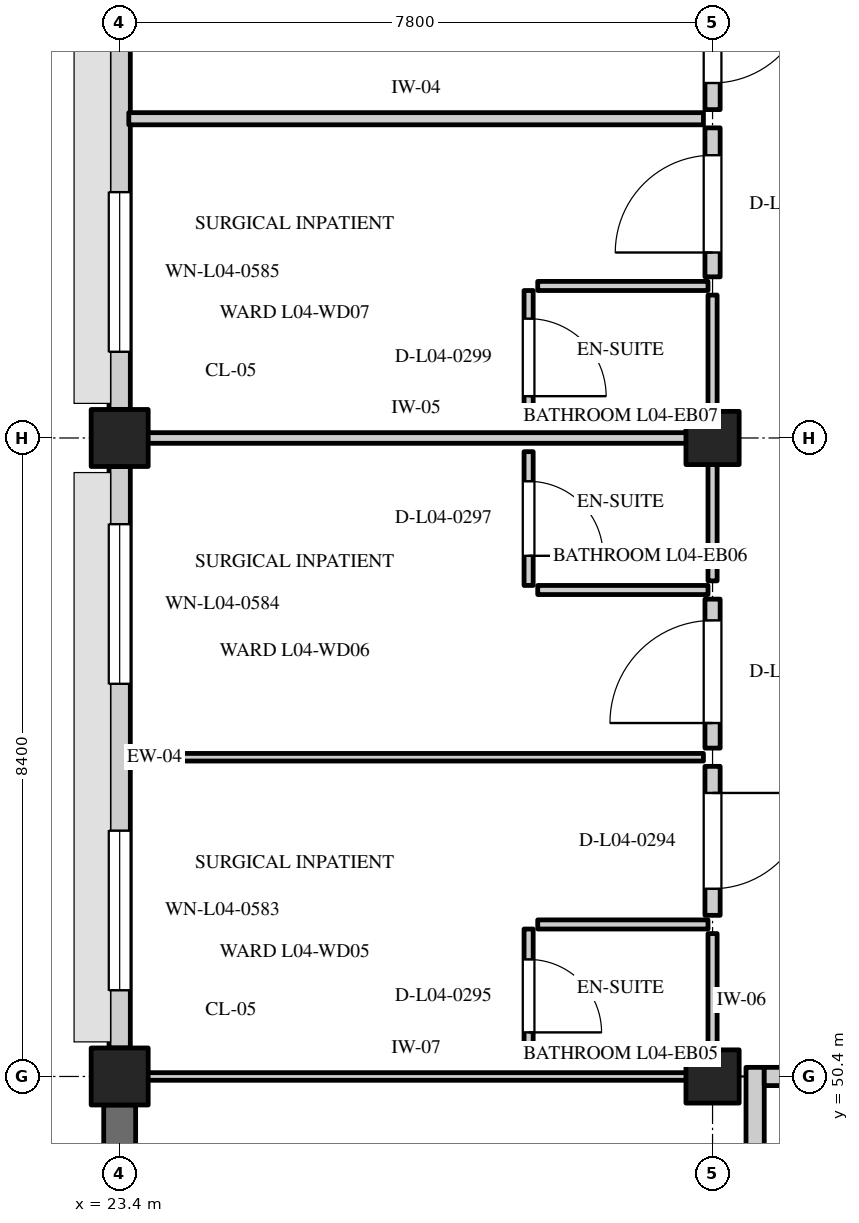
"""IFC4 building model, lengths in metres.
Left out: names, types, materials, properties, quantities, classifications, styles, units other than length and angle.
Written with IfcOpenShell. Run it as: python <this file> out.ifc"""

import sys

from ifc_helpers import new_model, si_unit, direction, frame, frame_2d, origin, origin_2d, place, context, subcontext, project, spatial, rectangle, extrude, element, fill, save


model = new_model("IFC4")
c1 = context("Model", 3, precision=1e-05, world=origin(), true_north=direction((0.0, 1.0)))
c2 = subcontext(c1, "Body", "Model", "MODEL_VIEW")
j1 = project(units=[si_unit("LENGTHUNIT", "METRE"), si_unit("PLANEANGLEUNIT", "RADIAN")], contexts=[c1])
p1 = place(None, origin())
s1 = spatial("IfcSite", under=j1, at=p1, CompositionType="ELEMENT")
p2 = place(p1, origin())
s2 = spatial("IfcBuilding", under=s1, at=p2, CompositionType="ELEMENT")
p3 = place(p2, frame((0.0, 0.0, 18.0)))
s3 = spatial("IfcBuildingStorey", under=s2, at=p3, CompositionType="ELEMENT", Elevation=18.0)
for number, where, z_axis, x_axis in (
    (1, (23.4, 50.4, 0.0), (0.0, 0.0, 1.0), (1.0, 0.0, 0.0)),
    (2, (23.4, 58.8, 0.0), (0.0, 0.0, 1.0), (1.0, 0.0, 0.0)),
):
    element("IfcColumn", number, at=place(p3, frame(where, z_axis=z_axis, x_axis=x_axis)), inside=s3, PredefinedType="COLUMN", context=c2, shape_type="SweptSolid", body=[
        extrude(rectangle(XDim=0.75, YDim=0.75, at=origin_2d()), origin(), (0.0, 0.0, 1.0), 4.2),
    ])
for number, where, z_axis, x_axis in (
    (3, (31.2, 50.4, 0.0), (0.0, 0.0, 1.0), (1.0, 0.0, 0.0)),
    (4, (31.2, 58.8, 0.0), (0.0, 0.0, 1.0), (1.0, 0.0, 0.0)),
):
    element("IfcColumn", number, at=place(p3, frame(where, z_axis=z_axis, x_axis=x_axis)), inside=s3, PredefinedType="COLUMN", context=c2, shape_type="SweptSolid", body=[
        extrude(rectangle(XDim=0.7, YDim=0.7, at=origin_2d()), origin(), (0.0, 0.0, 1.0), 4.2),
    ])
p4 = place(p3, frame((23.4, 42.375, 0.0), z_axis=(0.0, 0.0, 1.0), x_axis=(0.0, 1.0, 0.0)))
e5 = element("IfcWall", 5, at=p4, inside=s3, PredefinedType="SOLIDWALL", context=c2, shape_type="SweptSolid", body=[
    extrude(rectangle(XDim=7.65, YDim=0.42, at=frame_2d((3.825, 0.0))), origin(), (0.0, 0.0, 1.0), 3.235),
])
p5 = place(p4, frame((3.375, 0.0, 0.8)))
e6 = element("IfcOpeningElement", 6, at=p5, cuts=e5, PredefinedType="OPENING", context=c2, shape_type="SweptSolid", body=[
    extrude(rectangle(XDim=0.9, YDim=1.3, at=frame_2d((0.45, 0.65))), frame((0.0, 0.222, 0.0), z_axis=(0.0, -1.0, 0.0), x_axis=(1.0, 0.0, 0.0)), (0.0, 0.0, 1.0), 0.444),
])
p6 = place(p3, frame((23.4, 50.775, 0.0), z_axis=(0.0, 0.0, 1.0), x_axis=(0.0, 1.0, 0.0)))
e7 = element("IfcWall", 7, at=p6, inside=s3, PredefinedType="STANDARD", context=c2, shape_type="SweptSolid", body=[
    extrude(rectangle(XDim=7.65, YDim=0.28, at=frame_2d((3.825, 0.0))), origin(), (0.0, 0.0, 1.0), 3.235),
])
p7 = place(p6, frame((0.759, 0.0, 0.8)))
e8 = element("IfcOpeningElement", 8, at=p7, cuts=e7, PredefinedType="OPENING", context=c2, shape_type="SweptSolid", body=[
    extrude(rectangle(XDim=2.1, YDim=1.55, at=frame_2d((1.05, 0.775))), frame((0.0, 0.152, 0.0), z_axis=(0.0, -1.0, 0.0), x_axis=(1.0, 0.0, 0.0)), (0.0, 0.0, 1.0), 0.304),
])
p8 = place(p6, frame((4.791, 0.0, 0.8)))
e9 = element("IfcOpeningElement", 9, at=p8, cuts=e7, PredefinedType="OPENING", context=c2, shape_type="SweptSolid", body=[
    extrude(rectangle(XDim=2.1, YDim=1.55, at=frame_2d((1.05, 0.775))), frame((0.0, 0.152, 0.0), z_axis=(0.0, -1.0, 0.0), x_axis=(1.0, 0.0, 0.0)), (0.0, 0.0, 1.0), 0.304),
])
p9 = place(p3, frame((23.4, 59.175, 0.0), z_axis=(0.0, 0.0, 1.0), x_axis=(0.0, 1.0, 0.0)))
e10 = element("IfcWall", 10, at=p9, inside=s3, PredefinedType="STANDARD", context=c2, shape_type="SweptSolid", body=[
    extrude(rectangle(XDim=7.65, YDim=0.28, at=frame_2d((3.825, 0.0))), origin(), (0.0, 0.0, 1.0), 3.235),
])
p10 = place(p9, frame((0.759, 0.0, 0.8)))
e11 = element("IfcOpeningElement", 11, at=p10, cuts=e10, PredefinedType="OPENING", context=c2, shape_type="SweptSolid", body=[
    extrude(rectangle(XDim=2.1, YDim=1.45, at=frame_2d((1.05, 0.725))), frame((0.0, 0.152, 0.0), z_axis=(0.0, -1.0, 0.0), x_axis=(1.0, 0.0, 0.0)), (0.0, 0.0, 1.0), 0.304),
])
p11 = place(p9, frame((4.791, 0.0, 0.8)))
e12 = element("IfcOpeningElement", 12, at=p11, cuts=e10, PredefinedType="OPENING", context=c2, shape_type="SweptSolid", body=[
    extrude(rectangle(XDim=2.1, YDim=1.45, at=frame_2d((1.05, 0.725))), frame((0.0, 0.152, 0.0), z_axis=(0.0, -1.0, 0.0), x_axis=(1.0, 0.0, 0.0)), (0.0, 0.0, 1.0), 0.304),
])
p12 = place(p3, frame((31.76, 46.57, 0.0), z_axis=(0.0, 0.0, 1.0), x_axis=(0.0, 1.0, 0.0)))
e13 = element("IfcWall", 13, at=p12, inside=s3, PredefinedType="STANDARD", context=c2, shape_type="SweptSolid", body=[
    extrude(rectangle(XDim=3.95, YDim=0.24, at=frame_2d((1.975, 0.0))), origin(), (0.0, 0.0, 1.0), 3.385),
])
p13 = place(p3, frame((31.88, 50.4, 0.0), z_axis=(0.0, 0.0, 1.0), x_axis=(1.0, 0.0, 0.0)))
e14 = element("IfcWall", 14, at=p13, inside=s3, PredefinedType="STANDARD", context=c2, shape_type="SweptSolid", body=[
    extrude(rectangle(XDim=3.27, YDim=0.24, at=frame_2d((1.635, 0.0))), origin(), (0.0, 0.0, 1.0), 3.385),
])
p14 = place(p13, frame((0.91, 0.0, 0.0)))
e15 = element("IfcOpeningElement", 15, at=p14, cuts=e14, PredefinedType="OPENING", context=c2, shape_type="SweptSolid", body=[
    extrude(rectangle(XDim=1.45, YDim=2.2, at=frame_2d((0.725, 1.1))), frame((0.0, 0.132, 0.0), z_axis=(0.0, -1.0, 0.0), x_axis=(1.0, 0.0, 0.0)), (0.0, 0.0, 1.0), 0.264),
])
p15 = place(p3, frame((23.52, 50.4, 0.0), z_axis=(0.0, 0.0, 1.0), x_axis=(1.0, 0.0, 0.0)))
e16 = element("IfcWall", 16, at=p15, inside=s3, PredefinedType="PARTITIONING", context=c2, shape_type="SweptSolid", body=[
    extrude(rectangle(XDim=7.56, YDim=0.1, at=frame_2d((3.78, 0.0))), origin(), (0.0, 0.0, 1.0), 3.235),
])
p16 = place(p3, frame((23.52, 54.6, 0.0), z_axis=(0.0, 0.0, 1.0), x_axis=(1.0, 0.0, 0.0)))
e17 = element("IfcWall", 17, at=p16, inside=s3, PredefinedType="PARTITIONING", context=c2, shape_type="SweptSolid", body=[
    extrude(rectangle(XDim=7.56, YDim=0.1, at=frame_2d((3.78, 0.0))), origin(), (0.0, 0.0, 1.0), 3.865),
])
p17 = place(p3, frame((31.2, 52.52, 0.0), z_axis=(0.0, 0.0, 1.0), x_axis=(0.0, 1.0, 0.0)))
e18 = element("IfcWall", 18, at=p17, inside=s3, PredefinedType="STANDARD", context=c2, shape_type="SweptSolid", body=[
    extrude(rectangle(XDim=1.96, YDim=0.2, at=frame_2d((0.98, 0.0))), origin(), (0.0, 0.0, 1.0), 3.865),
])
p18 = place(p17, frame((0.35, 0.0, 0.0)))
e19 = element("IfcOpeningElement", 19, at=p18, cuts=e18, PredefinedType="OPENING", context=c2, shape_type="SweptSolid", body=[
    extrude(rectangle(XDim=1.26, YDim=2.1, at=frame_2d((0.63, 1.05))), frame((0.0, 0.112, 0.0), z_axis=(0.0, -1.0, 0.0), x_axis=(1.0, 0.0, 0.0)), (0.0, 0.0, 1.0), 0.224),
])
p19 = place(p3, frame((31.2, 50.52, 0.0), z_axis=(0.0, 0.0, 1.0), x_axis=(0.0, 1.0, 0.0)))
e20 = element("IfcWall", 20, at=p19, inside=s3, PredefinedType="PARTITIONING", context=c2, shape_type="SweptSolid", body=[
    extrude(rectangle(XDim=1.76, YDim=0.12, at=frame_2d((0.88, 0.0))), origin(), (0.0, 0.0, 1.0), 3.865),
])
p20 = place(p3, frame((28.9, 52.4, 0.0), z_axis=(0.0, 0.0, 1.0), x_axis=(1.0, 0.0, 0.0)))
e21 = element("IfcWall", 21, at=p20, inside=s3, PredefinedType="PARTITIONING", context=c2, shape_type="SweptSolid", body=[
    extrude(rectangle(XDim=2.24, YDim=0.12, at=frame_2d((1.12, 0.0))), origin(), (0.0, 0.0, 1.0), 3.865),
])
p21 = place(p3, frame((28.78, 50.58, 0.0), z_axis=(0.0, 0.0, 1.0), x_axis=(0.0, 1.0, 0.0)))
e22 = element("IfcWall", 22, at=p21, inside=s3, PredefinedType="PARTITIONING", context=c2, shape_type="SweptSolid", body=[
    extrude(rectangle(XDim=1.76, YDim=0.12, at=frame_2d((0.88, 0.0))), origin(), (0.0, 0.0, 1.0), 3.865),
])
p22 = place(p21, frame((0.4, 0.0, 0.0)))
e23 = element("IfcOpeningElement", 23, at=p22, cuts=e22, PredefinedType="OPENING", context=c2, shape_type="SweptSolid", body=[
    extrude(rectangle(XDim=0.96, YDim=2.12, at=frame_2d((0.48, 1.06))), frame((0.0, 0.072, 0.0), z_axis=(0.0, -1.0, 0.0), x_axis=(1.0, 0.0, 0.0)), (0.0, 0.0, 1.0), 0.144),
])
p23 = place(p3, frame((23.52, 58.8, 0.0), z_axis=(0.0, 0.0, 1.0), x_axis=(1.0, 0.0, 0.0)))
e24 = element("IfcWall", 24, at=p23, inside=s3, PredefinedType="PARTITIONING", context=c2, shape_type="SweptSolid", body=[
    extrude(rectangle(XDim=7.56, YDim=0.14, at=frame_2d((3.78, 0.0))), origin(), (0.0, 0.0, 1.0), 3.235),
])
p24 = place(p3, frame((31.2, 54.72, 0.0), z_axis=(0.0, 0.0, 1.0), x_axis=(0.0, 1.0, 0.0)))
e25 = element("IfcWall", 25, at=p24, inside=s3, PredefinedType="STANDARD", context=c2, shape_type="SweptSolid", body=[
    extrude(rectangle(XDim=1.96, YDim=0.2, at=frame_2d((0.98, 0.0))), origin(), (0.0, 0.0, 1.0), 3.865),
])
p25 = place(p24, frame((0.33, 0.0, 0.0)))
e26 = element("IfcOpeningElement", 26, at=p25, cuts=e25, PredefinedType="OPENING", context=c2, shape_type="SweptSolid", body=[
    extrude(rectangle(XDim=1.35, YDim=2.15, at=frame_2d((0.675, 1.075))), frame((0.0, 0.112, 0.0), z_axis=(0.0, -1.0, 0.0), x_axis=(1.0, 0.0, 0.0)), (0.0, 0.0, 1.0), 0.224),
])
p26 = place(p3, frame((31.2, 56.92, 0.0), z_axis=(0.0, 0.0, 1.0), x_axis=(0.0, 1.0, 0.0)))
e27 = element("IfcWall", 27, at=p26, inside=s3, PredefinedType="PARTITIONING", context=c2, shape_type="SweptSolid", body=[
    extrude(rectangle(XDim=1.76, YDim=0.12, at=frame_2d((0.88, 0.0))), origin(), (0.0, 0.0, 1.0), 3.865),
])
p27 = place(p3, frame((28.9, 56.8, 0.0), z_axis=(0.0, 0.0, 1.0), x_axis=(1.0, 0.0, 0.0)))
e28 = element("IfcWall", 28, at=p27, inside=s3, PredefinedType="PARTITIONING", context=c2, shape_type="SweptSolid", body=[
    extrude(rectangle(XDim=2.24, YDim=0.12, at=frame_2d((1.12, 0.0))), origin(), (0.0, 0.0, 1.0), 3.865),
])
p28 = place(p3, frame((28.78, 56.86, 0.0), z_axis=(0.0, 0.0, 1.0), x_axis=(0.0, 1.0, 0.0)))
e29 = element("IfcWall", 29, at=p28, inside=s3, PredefinedType="PARTITIONING", context=c2, shape_type="SweptSolid", body=[
    extrude(rectangle(XDim=1.76, YDim=0.12, at=frame_2d((0.88, 0.0))), origin(), (0.0, 0.0, 1.0), 3.865),
])
p29 = place(p28, frame((0.39, 0.0, 0.0)))
e30 = element("IfcOpeningElement", 30, at=p29, cuts=e29, PredefinedType="OPENING", context=c2, shape_type="SweptSolid", body=[
    extrude(rectangle(XDim=0.98, YDim=2.1, at=frame_2d((0.49, 1.05))), frame((0.0, 0.072, 0.0), z_axis=(0.0, -1.0, 0.0), x_axis=(1.0, 0.0, 0.0)), (0.0, 0.0, 1.0), 0.144),
])
p30 = place(p3, frame((23.52, 63.0, 0.0), z_axis=(0.0, 0.0, 1.0), x_axis=(1.0, 0.0, 0.0)))
e31 = element("IfcWall", 31, at=p30, inside=s3, PredefinedType="PARTITIONING", context=c2, shape_type="SweptSolid", body=[
    extrude(rectangle(XDim=7.56, YDim=0.16, at=frame_2d((3.78, 0.0))), origin(), (0.0, 0.0, 1.0), 3.865),
])
p31 = place(p3, frame((31.2, 60.92, 0.0), z_axis=(0.0, 0.0, 1.0), x_axis=(0.0, 1.0, 0.0)))
e32 = element("IfcWall", 32, at=p31, inside=s3, PredefinedType="STANDARD", context=c2, shape_type="SweptSolid", body=[
    extrude(rectangle(XDim=1.96, YDim=0.2, at=frame_2d((0.98, 0.0))), origin(), (0.0, 0.0, 1.0), 3.865),
])
p32 = place(p31, frame((0.32, 0.0, 0.0)))
e33 = element("IfcOpeningElement", 33, at=p32, cuts=e32, PredefinedType="OPENING", context=c2, shape_type="SweptSolid", body=[
    extrude(rectangle(XDim=1.28, YDim=2.15, at=frame_2d((0.64, 1.075))), frame((0.0, 0.112, 0.0), z_axis=(0.0, -1.0, 0.0), x_axis=(1.0, 0.0, 0.0)), (0.0, 0.0, 1.0), 0.224),
])
p33 = place(p3, frame((31.2, 58.92, 0.0), z_axis=(0.0, 0.0, 1.0), x_axis=(0.0, 1.0, 0.0)))
e34 = element("IfcWall", 34, at=p33, inside=s3, PredefinedType="PARTITIONING", context=c2, shape_type="SweptSolid", body=[
    extrude(rectangle(XDim=1.76, YDim=0.12, at=frame_2d((0.88, 0.0))), origin(), (0.0, 0.0, 1.0), 3.865),
])
p34 = place(p3, frame((28.9, 60.8, 0.0), z_axis=(0.0, 0.0, 1.0), x_axis=(1.0, 0.0, 0.0)))
e35 = element("IfcWall", 35, at=p34, inside=s3, PredefinedType="PARTITIONING", context=c2, shape_type="SweptSolid", body=[
    extrude(rectangle(XDim=2.24, YDim=0.12, at=frame_2d((1.12, 0.0))), origin(), (0.0, 0.0, 1.0), 3.865),
])
p35 = place(p3, frame((28.78, 58.98, 0.0), z_axis=(0.0, 0.0, 1.0), x_axis=(0.0, 1.0, 0.0)))
e36 = element("IfcWall", 36, at=p35, inside=s3, PredefinedType="PARTITIONING", context=c2, shape_type="SweptSolid", body=[
    extrude(rectangle(XDim=1.76, YDim=0.12, at=frame_2d((0.88, 0.0))), origin(), (0.0, 0.0, 1.0), 3.865),
])
p36 = place(p35, frame((0.37, 0.0, 0.0)))
e37 = element("IfcOpeningElement", 37, at=p36, cuts=e36, PredefinedType="OPENING", context=c2, shape_type="SweptSolid", body=[
    extrude(rectangle(XDim=1.02, YDim=2.15, at=frame_2d((0.51, 1.075))), frame((0.0, 0.072, 0.0), z_axis=(0.0, -1.0, 0.0), x_axis=(1.0, 0.0, 0.0)), (0.0, 0.0, 1.0), 0.144),
])
p37 = place(p3, frame((31.2, 63.12, 0.0), z_axis=(0.0, 0.0, 1.0), x_axis=(0.0, 1.0, 0.0)))
e38 = element("IfcWall", 38, at=p37, inside=s3, PredefinedType="STANDARD", context=c2, shape_type="SweptSolid", body=[
    extrude(rectangle(XDim=1.96, YDim=0.2, at=frame_2d((0.98, 0.0))), origin(), (0.0, 0.0, 1.0), 3.865),
])
p38 = place(p37, frame((0.35, 0.0, 0.0)))
e39 = element("IfcOpeningElement", 39, at=p38, cuts=e38, PredefinedType="OPENING", context=c2, shape_type="SweptSolid", body=[
    extrude(rectangle(XDim=1.26, YDim=2.1, at=frame_2d((0.63, 1.05))), frame((0.0, 0.112, 0.0), z_axis=(0.0, -1.0, 0.0), x_axis=(1.0, 0.0, 0.0)), (0.0, 0.0, 1.0), 0.224),
])
p39 = place(p7, origin())
e40 = element("IfcWindow", 40, at=p39, inside=s3, PartitioningType="DOUBLE_PANEL_VERTICAL", PredefinedType="WINDOW", context=c2, shape_type="SweptSolid", body=[
    extrude(rectangle(XDim=2.1, YDim=1.55, at=frame_2d((1.05, 0.775))), frame((0.0, 0.03, 0.0), z_axis=(0.0, -1.0, 0.0), x_axis=(1.0, 0.0, 0.0)), (0.0, 0.0, 1.0), 0.06),
])
fill(e8, e40)
p40 = place(p8, origin())
e41 = element("IfcWindow", 41, at=p40, inside=s3, PartitioningType="DOUBLE_PANEL_VERTICAL", PredefinedType="WINDOW", context=c2, shape_type="SweptSolid", body=[
    extrude(rectangle(XDim=2.1, YDim=1.55, at=frame_2d((1.05, 0.775))), frame((0.0, 0.03, 0.0), z_axis=(0.0, -1.0, 0.0), x_axis=(1.0, 0.0, 0.0)), (0.0, 0.0, 1.0), 0.06),
])
fill(e9, e41)
p41 = place(p10, origin())
e42 = element("IfcWindow", 42, at=p41, inside=s3, PartitioningType="DOUBLE_PANEL_VERTICAL", PredefinedType="WINDOW", context=c2, shape_type="SweptSolid", body=[
    extrude(rectangle(XDim=2.1, YDim=1.45, at=frame_2d((1.05, 0.725))), frame((0.0, 0.03, 0.0), z_axis=(0.0, -1.0, 0.0), x_axis=(1.0, 0.0, 0.0)), (0.0, 0.0, 1.0), 0.06),
])
fill(e11, e42)
p42 = place(p18, origin())
e43 = element("IfcDoor", 43, at=p42, inside=s3, OperationType="SINGLE_SWING_RIGHT", PredefinedType="DOOR", context=c2, shape_type="SweptSolid", body=[
    extrude(rectangle(XDim=1.26, YDim=2.1, at=frame_2d((0.63, 1.05))), frame((0.0, 0.025, 0.0), z_axis=(0.0, -1.0, 0.0), x_axis=(1.0, 0.0, 0.0)), (0.0, 0.0, 1.0), 0.05),
])
fill(e19, e43)
p43 = place(p22, frame((0.96, 0.0, 0.0), z_axis=(0.0, 0.0, 1.0), x_axis=(-1.0, 0.0, 0.0)))
e44 = element("IfcDoor", 44, at=p43, inside=s3, OperationType="SINGLE_SWING_RIGHT", PredefinedType="DOOR", context=c2, shape_type="SweptSolid", body=[
    extrude(rectangle(XDim=0.96, YDim=2.12, at=frame_2d((0.48, 1.06))), frame((0.0, 0.025, 0.0), z_axis=(0.0, -1.0, 0.0), x_axis=(1.0, 0.0, 0.0)), (0.0, 0.0, 1.0), 0.05),
])
fill(e23, e44)
p44 = place(p25, origin())
e45 = element("IfcDoor", 45, at=p44, inside=s3, OperationType="SINGLE_SWING_LEFT", PredefinedType="DOOR", context=c2, shape_type="SweptSolid", body=[
    extrude(rectangle(XDim=1.35, YDim=2.15, at=frame_2d((0.675, 1.075))), frame((0.0, 0.025, 0.0), z_axis=(0.0, -1.0, 0.0), x_axis=(1.0, 0.0, 0.0)), (0.0, 0.0, 1.0), 0.05),
])
fill(e26, e45)
p45 = place(p29, frame((0.98, 0.0, 0.0), z_axis=(0.0, 0.0, 1.0), x_axis=(-1.0, 0.0, 0.0)))
e46 = element("IfcDoor", 46, at=p45, inside=s3, OperationType="SINGLE_SWING_RIGHT", PredefinedType="DOOR", context=c2, shape_type="SweptSolid", body=[
    extrude(rectangle(XDim=0.98, YDim=2.1, at=frame_2d((0.49, 1.05))), frame((0.0, 0.025, 0.0), z_axis=(0.0, -1.0, 0.0), x_axis=(1.0, 0.0, 0.0)), (0.0, 0.0, 1.0), 0.05),
])
fill(e30, e46)
p46 = place(p32, origin())
e47 = element("IfcDoor", 47, at=p46, inside=s3, OperationType="SINGLE_SWING_LEFT", PredefinedType="DOOR", context=c2, shape_type="SweptSolid", body=[
    extrude(rectangle(XDim=1.28, YDim=2.15, at=frame_2d((0.64, 1.075))), frame((0.0, 0.025, 0.0), z_axis=(0.0, -1.0, 0.0), x_axis=(1.0, 0.0, 0.0)), (0.0, 0.0, 1.0), 0.05),
])
fill(e33, e47)
p47 = place(p36, frame((1.02, 0.0, 0.0), z_axis=(0.0, 0.0, 1.0), x_axis=(-1.0, 0.0, 0.0)))
e48 = element("IfcDoor", 48, at=p47, inside=s3, OperationType="SINGLE_SWING_RIGHT", PredefinedType="DOOR", context=c2, shape_type="SweptSolid", body=[
    extrude(rectangle(XDim=1.02, YDim=2.15, at=frame_2d((0.51, 1.075))), frame((0.0, 0.025, 0.0), z_axis=(0.0, -1.0, 0.0), x_axis=(1.0, 0.0, 0.0)), (0.0, 0.0, 1.0), 0.05),
])
fill(e37, e48)
p48 = place(p38, origin())
e49 = element("IfcDoor", 49, at=p48, inside=s3, OperationType="SINGLE_SWING_RIGHT", PredefinedType="DOOR", context=c2, shape_type="SweptSolid", body=[
    extrude(rectangle(XDim=1.26, YDim=2.1, at=frame_2d((0.63, 1.05))), frame((0.0, 0.025, 0.0), z_axis=(0.0, -1.0, 0.0), x_axis=(1.0, 0.0, 0.0)), (0.0, 0.0, 1.0), 0.05),
])
fill(e39, e49)
save(model, sys.argv[1])
